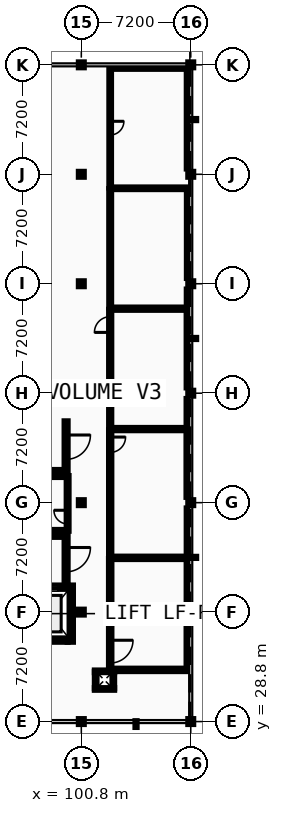
"""IFC4 building model, lengths in metres.
Left out: names, types, materials, properties, quantities, classifications, styles, units other than length and angle.
Written with IfcOpenShell. Run it as: python <this file> out.ifc"""

import sys

from ifc_helpers import new_model, si_unit, direction, frame, frame_2d, origin, origin_2d, place, context, subcontext, project, spatial, rectangle, hollow_circle, extrude, element, fill, save


model = new_model("IFC4")
c1 = context("Model", 3, precision=1e-05, world=origin(), true_north=direction((0.0, 1.0)))
c2 = subcontext(c1, "Body", "Model", "MODEL_VIEW")
j1 = project(units=[si_unit("LENGTHUNIT", "METRE"), si_unit("PLANEANGLEUNIT", "RADIAN")], contexts=[c1])
p1 = place(None, origin())
s1 = spatial("IfcSite", under=j1, at=p1, CompositionType="ELEMENT")
p2 = place(p1, origin())
s2 = spatial("IfcBuilding", under=s1, at=p2, CompositionType="ELEMENT")
p3 = place(p2, frame((0.0, 0.0, 5.2)))
s3 = spatial("IfcBuildingStorey", under=s2, at=p3, CompositionType="ELEMENT", Elevation=5.2)
for number, where, z_axis, x_axis in (
    (1, (100.8, 28.8, 0.0), (0.0, 0.0, 1.0), (1.0, 0.0, 0.0)),
    (2, (100.8, 36.0, 0.0), (0.0, 0.0, 1.0), (1.0, 0.0, 0.0)),
    (3, (100.8, 43.2, 0.0), (0.0, 0.0, 1.0), (1.0, 0.0, 0.0)),
    (4, (100.8, 50.4, 0.0), (0.0, 0.0, 1.0), (1.0, 0.0, 0.0)),
    (5, (100.8, 57.6, 0.0), (0.0, 0.0, 1.0), (1.0, 0.0, 0.0)),
    (6, (100.8, 64.8, 0.0), (0.0, 0.0, 1.0), (1.0, 0.0, 0.0)),
    (7, (100.8, 72.0, 0.0), (0.0, 0.0, 1.0), (1.0, 0.0, 0.0)),
    (8, (108.0, 28.8, 0.0), (0.0, 0.0, 1.0), (1.0, 0.0, 0.0)),
    (9, (108.0, 36.0, 0.0), (0.0, 0.0, 1.0), (1.0, 0.0, 0.0)),
    (10, (108.0, 43.2, 0.0), (0.0, 0.0, 1.0), (1.0, 0.0, 0.0)),
    (11, (108.0, 50.4, 0.0), (0.0, 0.0, 1.0), (1.0, 0.0, 0.0)),
    (12, (108.0, 57.6, 0.0), (0.0, 0.0, 1.0), (1.0, 0.0, 0.0)),
    (13, (108.0, 64.8, 0.0), (0.0, 0.0, 1.0), (1.0, 0.0, 0.0)),
    (14, (108.0, 72.0, 0.0), (0.0, 0.0, 1.0), (1.0, 0.0, 0.0)),
):
    element("IfcColumn", number, at=place(p3, frame(where, z_axis=z_axis, x_axis=x_axis)), inside=s3, PredefinedType="COLUMN", context=c2, shape_type="SweptSolid", body=[
        extrude(hollow_circle(Radius=0.162, WallThickness=0.012, at=origin_2d()), origin(), (0.0, 0.0, 1.0), 4.4),
    ])
p4 = place(p3, frame((97.45, 34.225, 0.0), z_axis=(0.0, 0.0, 1.0), x_axis=(1.0, 0.0, 0.0)))
e15 = element("IfcWall", 15, at=p4, inside=s3, PredefinedType="SHEAR", context=c2, shape_type="SweptSolid", body=[
    extrude(rectangle(XDim=2.45, YDim=0.35, at=frame_2d((1.225, 0.0))), origin(), (0.0, 0.0, 1.0), 4.185),
])
p5 = place(p3, frame((97.45, 37.575, 0.0), z_axis=(0.0, 0.0, 1.0), x_axis=(1.0, 0.0, 0.0)))
e16 = element("IfcWall", 16, at=p5, inside=s3, PredefinedType="SHEAR", context=c2, shape_type="SweptSolid", body=[
    extrude(rectangle(XDim=2.45, YDim=0.35, at=frame_2d((1.225, 0.0))), origin(), (0.0, 0.0, 1.0), 4.185),
])
p6 = place(p5, frame((0.625, 0.0, 0.0)))
e17 = element("IfcOpeningElement", 17, at=p6, cuts=e16, PredefinedType="OPENING", context=c2, shape_type="SweptSolid", body=[
    extrude(rectangle(XDim=1.2, YDim=2.2, at=frame_2d((0.6, 1.1))), frame((0.0, 0.185, 0.0), z_axis=(0.0, -1.0, 0.0), x_axis=(1.0, 0.0, 0.0)), (0.0, 0.0, 1.0), 0.37),
])
p7 = place(p3, frame((100.075, 34.05, 0.0), z_axis=(0.0, 0.0, 1.0), x_axis=(0.0, 1.0, 0.0)))
e18 = element("IfcWall", 18, at=p7, inside=s3, PredefinedType="SHEAR", context=c2, shape_type="SweptSolid", body=[
    extrude(rectangle(XDim=3.7, YDim=0.35, at=frame_2d((1.85, 0.0))), origin(), (0.0, 0.0, 1.0), 4.185),
])
p8 = place(p3, frame((99.8, 37.75, 0.0), z_axis=(0.0, 0.0, 1.0), x_axis=(0.0, 1.0, 0.0)))
e19 = element("IfcWall", 19, at=p8, inside=s3, PredefinedType="PARTITIONING", context=c2, shape_type="SweptSolid", body=[
    extrude(rectangle(XDim=3.4, YDim=0.2, at=frame_2d((1.7, 0.0))), origin(), (0.0, 0.0, 1.0), 4.185),
])
p9 = place(p8, frame((0.9, 0.0, 0.0)))
e20 = element("IfcOpeningElement", 20, at=p9, cuts=e19, PredefinedType="OPENING", context=c2, shape_type="SweptSolid", body=[
    extrude(rectangle(XDim=1.6, YDim=2.2, at=frame_2d((0.8, 1.1))), frame((0.0, 0.11, 0.0), z_axis=(0.0, -1.0, 0.0), x_axis=(1.0, 0.0, 0.0)), (0.0, 0.0, 1.0), 0.22),
])
p10 = place(p3, frame((93.95, 41.05, 0.0), z_axis=(0.0, 0.0, 1.0), x_axis=(1.0, 0.0, 0.0)))
e21 = element("IfcWall", 21, at=p10, inside=s3, PredefinedType="PARTITIONING", context=c2, shape_type="SweptSolid", body=[
    extrude(rectangle(XDim=5.75, YDim=0.2, at=frame_2d((2.875, 0.0))), origin(), (0.0, 0.0, 1.0), 4.185),
])
p11 = place(p3, frame((99.8, 45.15, 0.0), z_axis=(0.0, 0.0, 1.0), x_axis=(0.0, 1.0, 0.0)))
e22 = element("IfcWall", 22, at=p11, inside=s3, PredefinedType="PARTITIONING", context=c2, shape_type="SweptSolid", body=[
    extrude(rectangle(XDim=3.4, YDim=0.2, at=frame_2d((1.7, 0.0))), origin(), (0.0, 0.0, 1.0), 4.185),
])
p12 = place(p11, frame((0.9, 0.0, 0.0)))
e23 = element("IfcOpeningElement", 23, at=p12, cuts=e22, PredefinedType="OPENING", context=c2, shape_type="SweptSolid", body=[
    extrude(rectangle(XDim=1.6, YDim=2.2, at=frame_2d((0.8, 1.1))), frame((0.0, 0.11, 0.0), z_axis=(0.0, -1.0, 0.0), x_axis=(1.0, 0.0, 0.0)), (0.0, 0.0, 1.0), 0.22),
])
p13 = place(p3, frame((93.95, 45.25, 0.0), z_axis=(0.0, 0.0, 1.0), x_axis=(1.0, 0.0, 0.0)))
e24 = element("IfcWall", 24, at=p13, inside=s3, PredefinedType="PARTITIONING", context=c2, shape_type="SweptSolid", body=[
    extrude(rectangle(XDim=5.75, YDim=0.2, at=frame_2d((2.875, 0.0))), origin(), (0.0, 0.0, 1.0), 4.185),
])
for number, where, z_axis, x_axis in (
    (25, (101.69, 30.945, 0.0), (0.0, 0.0, 1.0), (1.0, 0.0, 0.0)),
    (26, (101.69, 32.105, 0.0), (0.0, 0.0, 1.0), (1.0, 0.0, 0.0)),
):
    element("IfcWall", number, at=place(p3, frame(where, z_axis=z_axis, x_axis=x_axis)), inside=s3, PredefinedType="PARTITIONING", context=c2, shape_type="SweptSolid", body=[
        extrude(rectangle(XDim=1.27, YDim=0.11, at=frame_2d((0.635, 0.0))), origin(), (0.0, 0.0, 1.0), 4.185),
    ])
for number, where, z_axis, x_axis in (
    (27, (101.745, 31.0, 0.0), (0.0, 0.0, 1.0), (0.0, 1.0, 0.0)),
    (28, (102.905, 31.0, 0.0), (0.0, 0.0, 1.0), (0.0, 1.0, 0.0)),
):
    element("IfcWall", number, at=place(p3, frame(where, z_axis=z_axis, x_axis=x_axis)), inside=s3, PredefinedType="PARTITIONING", context=c2, shape_type="SweptSolid", body=[
        extrude(rectangle(XDim=1.05, YDim=0.11, at=frame_2d((0.525, 0.0))), origin(), (0.0, 0.0, 1.0), 4.185),
    ])
p14 = place(p3, frame((103.035, 32.2, 0.0), z_axis=(0.0, 0.0, 1.0), x_axis=(1.0, 0.0, 0.0)))
e29 = element("IfcWall", 29, at=p14, inside=s3, PredefinedType="PARTITIONING", context=c2, shape_type="SweptSolid", body=[
    extrude(rectangle(XDim=4.765, YDim=0.16, at=frame_2d((2.383, 0.0))), origin(), (0.0, 0.0, 1.0), 4.185),
])
p15 = place(p3, frame((102.7, 39.57, 0.0), z_axis=(0.0, 0.0, 1.0), x_axis=(1.0, 0.0, 0.0)))
e30 = element("IfcWall", 30, at=p15, inside=s3, PredefinedType="PARTITIONING", context=c2, shape_type="SweptSolid", body=[
    extrude(rectangle(XDim=5.1, YDim=0.16, at=frame_2d((2.55, 0.0))), origin(), (0.0, 0.0, 1.0), 4.185),
])
p16 = place(p3, frame((93.8, 41.35, 0.0), z_axis=(0.0, 0.0, 1.0), x_axis=(1.0, 0.0, 0.0)))
e31 = element("IfcWall", 31, at=p16, inside=s3, PredefinedType="PARTITIONING", context=c2, shape_type="SweptSolid", body=[
    extrude(rectangle(XDim=5.88, YDim=0.11, at=frame_2d((2.94, 0.0))), origin(), (0.0, 0.0, 1.0), 4.185),
])
p17 = place(p3, frame((93.8, 44.95, 0.0), z_axis=(0.0, 0.0, 1.0), x_axis=(1.0, 0.0, 0.0)))
e32 = element("IfcWall", 32, at=p17, inside=s3, PredefinedType="PARTITIONING", context=c2, shape_type="SweptSolid", body=[
    extrude(rectangle(XDim=5.88, YDim=0.125, at=frame_2d((2.94, 0.0))), origin(), (0.0, 0.0, 1.0), 4.185),
])
for number, where, z_axis, x_axis in (
    (33, (102.7, 48.04, 0.0), (0.0, 0.0, 1.0), (1.0, 0.0, 0.0)),
    (34, (102.7, 55.96, 0.0), (0.0, 0.0, 1.0), (1.0, 0.0, 0.0)),
):
    element("IfcWall", number, at=place(p3, frame(where, z_axis=z_axis, x_axis=x_axis)), inside=s3, PredefinedType="PARTITIONING", context=c2, shape_type="SweptSolid", body=[
        extrude(rectangle(XDim=5.1, YDim=0.15, at=frame_2d((2.55, 0.0))), origin(), (0.0, 0.0, 1.0), 4.185),
    ])
p18 = place(p3, frame((102.7, 63.88, 0.0), z_axis=(0.0, 0.0, 1.0), x_axis=(1.0, 0.0, 0.0)))
e35 = element("IfcWall", 35, at=p18, inside=s3, PredefinedType="PARTITIONING", context=c2, shape_type="SweptSolid", body=[
    extrude(rectangle(XDim=5.1, YDim=0.11, at=frame_2d((2.55, 0.0))), origin(), (0.0, 0.0, 1.0), 4.185),
])
p19 = place(p3, frame((102.7, 71.8, 0.0), z_axis=(0.0, 0.0, 1.0), x_axis=(1.0, 0.0, 0.0)))
e36 = element("IfcWall", 36, at=p19, inside=s3, PredefinedType="PARTITIONING", context=c2, shape_type="SweptSolid", body=[
    extrude(rectangle(XDim=4.92, YDim=0.125, at=frame_2d((2.46, 0.0))), origin(), (0.0, 0.0, 1.0), 4.185),
])
p20 = place(p3, frame((99.9, 41.35, 0.0), z_axis=(0.0, 0.0, 1.0), x_axis=(0.0, 1.0, 0.0)))
e37 = element("IfcWall", 37, at=p20, inside=s3, PredefinedType="PARTITIONING", context=c2, shape_type="SweptSolid", body=[
    extrude(rectangle(XDim=3.6, YDim=0.125, at=frame_2d((1.8, 0.0))), origin(), (0.0, 0.0, 1.0), 4.185),
])
p21 = place(p20, frame((0.45, 0.0, 0.0)))
e38 = element("IfcOpeningElement", 38, at=p21, cuts=e37, PredefinedType="OPENING", context=c2, shape_type="SweptSolid", body=[
    extrude(rectangle(XDim=0.9, YDim=2.1, at=frame_2d((0.45, 1.05))), frame((0.0, 0.073, 0.0), z_axis=(0.0, -1.0, 0.0), x_axis=(1.0, 0.0, 0.0)), (0.0, 0.0, 1.0), 0.145),
])
p22 = place(p3, frame((102.7, 32.2, 0.0), z_axis=(0.0, 0.0, 1.0), x_axis=(0.0, 1.0, 0.0)))
e39 = element("IfcWall", 39, at=p22, inside=s3, PredefinedType="PARTITIONING", context=c2, shape_type="SweptSolid", body=[
    extrude(rectangle(XDim=7.29, YDim=0.16, at=frame_2d((3.645, 0.0))), origin(), (0.0, 0.0, 1.0), 4.185),
])
p23 = place(p22, frame((0.45, 0.0, 0.0)))
e40 = element("IfcOpeningElement", 40, at=p23, cuts=e39, PredefinedType="OPENING", context=c2, shape_type="SweptSolid", body=[
    extrude(rectangle(XDim=1.5, YDim=2.2, at=frame_2d((0.75, 1.1))), frame((0.0, 0.09, 0.0), z_axis=(0.0, -1.0, 0.0), x_axis=(1.0, 0.0, 0.0)), (0.0, 0.0, 1.0), 0.18),
])
p24 = place(p3, frame((102.7, 39.65, 0.0), z_axis=(0.0, 0.0, 1.0), x_axis=(0.0, 1.0, 0.0)))
e41 = element("IfcWall", 41, at=p24, inside=s3, PredefinedType="PARTITIONING", context=c2, shape_type="SweptSolid", body=[
    extrude(rectangle(XDim=8.315, YDim=0.15, at=frame_2d((4.158, 0.0))), origin(), (0.0, 0.0, 1.0), 4.185),
])
p25 = place(p24, frame((6.855, 0.0, 0.0)))
e42 = element("IfcOpeningElement", 42, at=p25, cuts=e41, PredefinedType="OPENING", context=c2, shape_type="SweptSolid", body=[
    extrude(rectangle(XDim=1.01, YDim=2.124, at=frame_2d((0.505, 1.062))), frame((0.0, 0.085, 0.0), z_axis=(0.0, -1.0, 0.0), x_axis=(1.0, 0.0, 0.0)), (0.0, 0.0, 1.0), 0.17),
])
p26 = place(p3, frame((102.7, 48.115, 0.0), z_axis=(0.0, 0.0, 1.0), x_axis=(0.0, 1.0, 0.0)))
e43 = element("IfcWall", 43, at=p26, inside=s3, PredefinedType="PARTITIONING", context=c2, shape_type="SweptSolid", body=[
    extrude(rectangle(XDim=7.77, YDim=0.142, at=frame_2d((3.885, 0.0))), origin(), (0.0, 0.0, 1.0), 4.185),
])
p27 = place(p26, frame((6.284, 0.0, 0.0)))
e44 = element("IfcOpeningElement", 44, at=p27, cuts=e43, PredefinedType="OPENING", context=c2, shape_type="SweptSolid", body=[
    extrude(rectangle(XDim=1.036, YDim=2.124, at=frame_2d((0.518, 1.062))), frame((0.0, 0.081, 0.0), z_axis=(0.0, -1.0, 0.0), x_axis=(1.0, 0.0, 0.0)), (0.0, 0.0, 1.0), 0.162),
])
p28 = place(p3, frame((102.7, 56.035, 0.0), z_axis=(0.0, 0.0, 1.0), x_axis=(0.0, 1.0, 0.0)))
e45 = element("IfcWall", 45, at=p28, inside=s3, PredefinedType="PARTITIONING", context=c2, shape_type="SweptSolid", body=[
    extrude(rectangle(XDim=7.79, YDim=0.125, at=frame_2d((3.895, 0.0))), origin(), (0.0, 0.0, 1.0), 4.185),
])
p29 = place(p28, frame((3.395, 0.0, 0.0)))
e46 = element("IfcOpeningElement", 46, at=p29, cuts=e45, PredefinedType="OPENING", context=c2, shape_type="SweptSolid", body=[
    extrude(rectangle(XDim=1.0, YDim=2.1, at=frame_2d((0.5, 1.05))), frame((0.0, 0.073, 0.0), z_axis=(0.0, -1.0, 0.0), x_axis=(1.0, 0.0, 0.0)), (0.0, 0.0, 1.0), 0.145),
])
p30 = place(p3, frame((102.7, 63.935, 0.0), z_axis=(0.0, 0.0, 1.0), x_axis=(0.0, 1.0, 0.0)))
e47 = element("IfcWall", 47, at=p30, inside=s3, PredefinedType="PARTITIONING", context=c2, shape_type="SweptSolid", body=[
    extrude(rectangle(XDim=7.802, YDim=0.11, at=frame_2d((3.901, 0.0))), origin(), (0.0, 0.0, 1.0), 4.185),
])
p31 = place(p30, frame((3.451, 0.0, 0.0)))
e48 = element("IfcOpeningElement", 48, at=p31, cuts=e47, PredefinedType="OPENING", context=c2, shape_type="SweptSolid", body=[
    extrude(rectangle(XDim=0.9, YDim=2.1, at=frame_2d((0.45, 1.05))), frame((0.0, 0.065, 0.0), z_axis=(0.0, -1.0, 0.0), x_axis=(1.0, 0.0, 0.0)), (0.0, 0.0, 1.0), 0.13),
])
p32 = place(p3, frame((107.8, 32.28, 0.0), z_axis=(0.0, 0.0, 1.0), x_axis=(0.0, 1.0, 0.0)))
e49 = element("IfcWall", 49, at=p32, inside=s3, PredefinedType="PARTITIONING", context=c2, shape_type="SweptSolid", body=[
    extrude(rectangle(XDim=3.34, YDim=0.15, at=frame_2d((1.67, 0.0))), origin(), (0.0, 0.0, 1.0), 3.81),
])
p33 = place(p3, frame((107.8, 36.38, 0.0), z_axis=(0.0, 0.0, 1.0), x_axis=(0.0, 1.0, 0.0)))
e50 = element("IfcWall", 50, at=p33, inside=s3, PredefinedType="PARTITIONING", context=c2, shape_type="SweptSolid", body=[
    extrude(rectangle(XDim=3.11, YDim=0.142, at=frame_2d((1.555, 0.0))), origin(), (0.0, 0.0, 1.0), 3.81),
])
p34 = place(p3, frame((107.8, 39.65, 0.0), z_axis=(0.0, 0.0, 1.0), x_axis=(0.0, 1.0, 0.0)))
e51 = element("IfcWall", 51, at=p34, inside=s3, PredefinedType="PARTITIONING", context=c2, shape_type="SweptSolid", body=[
    extrude(rectangle(XDim=3.17, YDim=0.135, at=frame_2d((1.585, 0.0))), origin(), (0.0, 0.0, 1.0), 3.81),
])
p35 = place(p3, frame((107.8, 43.58, 0.0), z_axis=(0.0, 0.0, 1.0), x_axis=(0.0, 1.0, 0.0)))
e52 = element("IfcWall", 52, at=p35, inside=s3, PredefinedType="PARTITIONING", context=c2, shape_type="SweptSolid", body=[
    extrude(rectangle(XDim=4.385, YDim=0.16, at=frame_2d((2.192, 0.0))), origin(), (0.0, 0.0, 1.0), 3.81),
])
p36 = place(p3, frame((107.8, 48.115, 0.0), z_axis=(0.0, 0.0, 1.0), x_axis=(0.0, 1.0, 0.0)))
e53 = element("IfcWall", 53, at=p36, inside=s3, PredefinedType="PARTITIONING", context=c2, shape_type="SweptSolid", body=[
    extrude(rectangle(XDim=1.905, YDim=0.15, at=frame_2d((0.953, 0.0))), origin(), (0.0, 0.0, 1.0), 3.81),
])
p37 = place(p3, frame((107.8, 50.78, 0.0), z_axis=(0.0, 0.0, 1.0), x_axis=(0.0, 1.0, 0.0)))
e54 = element("IfcWall", 54, at=p37, inside=s3, PredefinedType="PARTITIONING", context=c2, shape_type="SweptSolid", body=[
    extrude(rectangle(XDim=5.105, YDim=0.142, at=frame_2d((2.552, 0.0))), origin(), (0.0, 0.0, 1.0), 3.81),
])
p38 = place(p3, frame((107.8, 56.035, 0.0), z_axis=(0.0, 0.0, 1.0), x_axis=(0.0, 1.0, 0.0)))
e55 = element("IfcWall", 55, at=p38, inside=s3, PredefinedType="PARTITIONING", context=c2, shape_type="SweptSolid", body=[
    extrude(rectangle(XDim=1.185, YDim=0.125, at=frame_2d((0.593, 0.0))), origin(), (0.0, 0.0, 1.0), 3.81),
])
p39 = place(p3, frame((107.8, 57.98, 0.0), z_axis=(0.0, 0.0, 1.0), x_axis=(0.0, 1.0, 0.0)))
e56 = element("IfcWall", 56, at=p39, inside=s3, PredefinedType="PARTITIONING", context=c2, shape_type="SweptSolid", body=[
    extrude(rectangle(XDim=5.845, YDim=0.11, at=frame_2d((2.922, 0.0))), origin(), (0.0, 0.0, 1.0), 4.185),
])
p40 = place(p3, frame((107.8, 65.18, 0.0), z_axis=(0.0, 0.0, 1.0), x_axis=(0.0, 1.0, 0.0)))
e57 = element("IfcWall", 57, at=p40, inside=s3, PredefinedType="PARTITIONING", context=c2, shape_type="SweptSolid", body=[
    extrude(rectangle(XDim=6.44, YDim=0.125, at=frame_2d((3.22, 0.0))), origin(), (0.0, 0.0, 1.0), 4.185),
])
p41 = place(p6, origin())
e58 = element("IfcDoor", 58, at=p41, inside=s3, OperationType="SLIDING_TO_RIGHT", PredefinedType="DOOR", context=c2, shape_type="SweptSolid", body=[
    extrude(rectangle(XDim=1.2, YDim=2.2, at=frame_2d((0.6, 1.1))), frame((0.0, 0.025, 0.0), z_axis=(0.0, -1.0, 0.0), x_axis=(1.0, 0.0, 0.0)), (0.0, 0.0, 1.0), 0.05),
])
fill(e17, e58)
p42 = place(p9, origin())
e59 = element("IfcDoor", 59, at=p42, inside=s3, OperationType="DOUBLE_DOOR_SINGLE_SWING", PredefinedType="DOOR", context=c2, shape_type="SweptSolid", body=[
    extrude(rectangle(XDim=1.6, YDim=2.2, at=frame_2d((0.8, 1.1))), frame((0.0, 0.025, 0.0), z_axis=(0.0, -1.0, 0.0), x_axis=(1.0, 0.0, 0.0)), (0.0, 0.0, 1.0), 0.05),
])
fill(e20, e59)
p43 = place(p12, origin())
e60 = element("IfcDoor", 60, at=p43, inside=s3, OperationType="DOUBLE_DOOR_SINGLE_SWING", PredefinedType="DOOR", context=c2, shape_type="SweptSolid", body=[
    extrude(rectangle(XDim=1.6, YDim=2.2, at=frame_2d((0.8, 1.1))), frame((0.0, 0.025, 0.0), z_axis=(0.0, -1.0, 0.0), x_axis=(1.0, 0.0, 0.0)), (0.0, 0.0, 1.0), 0.05),
])
fill(e23, e60)
p44 = place(p23, origin())
e61 = element("IfcDoor", 61, at=p44, inside=s3, OperationType="DOUBLE_DOOR_SINGLE_SWING", PredefinedType="DOOR", context=c2, shape_type="SweptSolid", body=[
    extrude(rectangle(XDim=1.5, YDim=2.2, at=frame_2d((0.75, 1.1))), frame((0.0, 0.025, 0.0), z_axis=(0.0, -1.0, 0.0), x_axis=(1.0, 0.0, 0.0)), (0.0, 0.0, 1.0), 0.05),
])
fill(e40, e61)
p45 = place(p25, origin())
e62 = element("IfcDoor", 62, at=p45, inside=s3, OperationType="SINGLE_SWING_RIGHT", PredefinedType="DOOR", context=c2, shape_type="SweptSolid", body=[
    extrude(rectangle(XDim=1.01, YDim=2.124, at=frame_2d((0.505, 1.062))), frame((0.0, 0.025, 0.0), z_axis=(0.0, -1.0, 0.0), x_axis=(1.0, 0.0, 0.0)), (0.0, 0.0, 1.0), 0.05),
])
fill(e42, e62)
p46 = place(p27, origin())
e63 = element("IfcDoor", 63, at=p46, inside=s3, OperationType="SINGLE_SWING_LEFT", PredefinedType="DOOR", context=c2, shape_type="SweptSolid", body=[
    extrude(rectangle(XDim=1.036, YDim=2.124, at=frame_2d((0.518, 1.062))), frame((0.0, 0.025, 0.0), z_axis=(0.0, -1.0, 0.0), x_axis=(1.0, 0.0, 0.0)), (0.0, 0.0, 1.0), 0.05),
])
fill(e44, e63)
p47 = place(p29, origin())
e64 = element("IfcDoor", 64, at=p47, inside=s3, OperationType="SLIDING_TO_LEFT", PredefinedType="DOOR", context=c2, shape_type="SweptSolid", body=[
    extrude(rectangle(XDim=1.0, YDim=2.1, at=frame_2d((0.5, 1.05))), frame((0.0, 0.025, 0.0), z_axis=(0.0, -1.0, 0.0), x_axis=(1.0, 0.0, 0.0)), (0.0, 0.0, 1.0), 0.05),
])
fill(e46, e64)
p48 = place(p31, origin())
e65 = element("IfcDoor", 65, at=p48, inside=s3, OperationType="SINGLE_SWING_RIGHT", PredefinedType="DOOR", context=c2, shape_type="SweptSolid", body=[
    extrude(rectangle(XDim=0.9, YDim=2.1, at=frame_2d((0.45, 1.05))), frame((0.0, 0.025, 0.0), z_axis=(0.0, -1.0, 0.0), x_axis=(1.0, 0.0, 0.0)), (0.0, 0.0, 1.0), 0.05),
])
fill(e48, e65)
p49 = place(p21, frame((0.9, 0.0, 0.0), z_axis=(0.0, 0.0, 1.0), x_axis=(-1.0, 0.0, 0.0)))
e66 = element("IfcDoor", 66, at=p49, inside=s3, OperationType="SINGLE_SWING_RIGHT", PredefinedType="DOOR", context=c2, shape_type="SweptSolid", body=[
    extrude(rectangle(XDim=0.9, YDim=2.1, at=frame_2d((0.45, 1.05))), frame((0.0, 0.025, 0.0), z_axis=(0.0, -1.0, 0.0), x_axis=(1.0, 0.0, 0.0)), (0.0, 0.0, 1.0), 0.05),
])
fill(e38, e66)
save(model, sys.argv[1])
